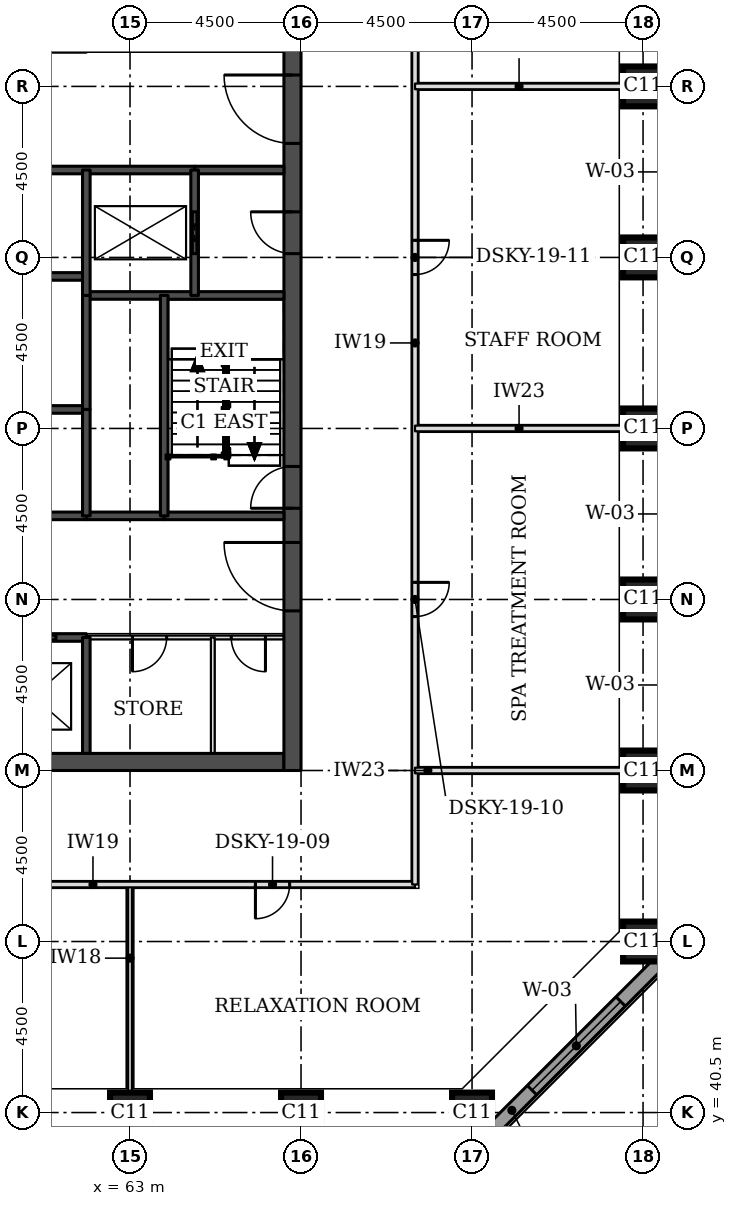
"""IFC4 building model, lengths in metres.
Left out: names, types, materials, properties, quantities, classifications, styles, units other than length and angle.
Written with IfcOpenShell. Run it as: python <this file> out.ifc"""

import sys

from ifc_helpers import new_model, si_unit, direction, frame, frame_2d, origin, origin_2d, place, context, subcontext, project, spatial, rectangle, extrude, element, fill, save


model = new_model("IFC4")
c1 = context("Model", 3, precision=1e-05, world=origin(), true_north=direction((0.0, 1.0)))
c2 = subcontext(c1, "Body", "Model", "MODEL_VIEW")
j1 = project(units=[si_unit("LENGTHUNIT", "METRE"), si_unit("PLANEANGLEUNIT", "RADIAN")], contexts=[c1])
p1 = place(None, origin())
s1 = spatial("IfcSite", under=j1, at=p1, CompositionType="ELEMENT")
p2 = place(p1, origin())
s2 = spatial("IfcBuilding", under=s1, at=p2, CompositionType="ELEMENT")
p3 = place(p2, frame((0.0, 0.0, 74.3)))
s3 = spatial("IfcBuildingStorey", under=s2, at=p3, CompositionType="ELEMENT", Elevation=74.3)
for number, where, z_axis, x_axis in (
    (1, (63.0, 40.5, 0.0), (0.0, 0.0, 1.0), (1.0, 0.0, 0.0)),
    (2, (67.5, 40.5, 0.0), (0.0, 0.0, 1.0), (1.0, 0.0, 0.0)),
    (3, (72.0, 40.5, 0.0), (0.0, 0.0, 1.0), (1.0, 0.0, 0.0)),
    (4, (76.5, 45.0, 0.0), (0.0, 0.0, 1.0), (1.0, 0.0, 0.0)),
    (5, (76.5, 49.5, 0.0), (0.0, 0.0, 1.0), (1.0, 0.0, 0.0)),
    (6, (76.5, 54.0, 0.0), (0.0, 0.0, 1.0), (1.0, 0.0, 0.0)),
    (7, (76.5, 58.5, 0.0), (0.0, 0.0, 1.0), (1.0, 0.0, 0.0)),
    (8, (76.5, 63.0, 0.0), (0.0, 0.0, 1.0), (1.0, 0.0, 0.0)),
    (9, (76.5, 67.5, 0.0), (0.0, 0.0, 1.0), (1.0, 0.0, 0.0)),
):
    element("IfcColumn", number, at=place(p3, frame(where, z_axis=z_axis, x_axis=x_axis)), inside=s3, PredefinedType="COLUMN", context=c2, shape_type="SweptSolid", body=[
        extrude(rectangle(XDim=1.05, YDim=1.05, at=origin_2d()), origin(), (0.0, 0.0, 1.0), 4.6),
    ])
p4 = place(p3, frame((45.45, 49.725, 0.0), z_axis=(0.0, 0.0, 1.0), x_axis=(1.0, 0.0, 0.0)))
e10 = element("IfcWall", 10, at=p4, inside=s3, PredefinedType="SHEAR", context=c2, shape_type="SweptSolid", body=[
    extrude(rectangle(XDim=21.6, YDim=0.45, at=frame_2d((10.8, 0.0))), origin(), (0.0, 0.0, 1.0), 4.6),
])
p5 = place(p3, frame((67.275, 49.5, 0.0), z_axis=(0.0, 0.0, 1.0), x_axis=(0.0, 1.0, 0.0)))
e11 = element("IfcWall", 11, at=p5, inside=s3, PredefinedType="SHEAR", context=c2, shape_type="SweptSolid", body=[
    extrude(rectangle(XDim=22.5, YDim=0.45, at=frame_2d((11.25, 0.0))), origin(), (0.0, 0.0, 1.0), 4.6),
])
p6 = place(p5, frame((4.2, 0.0, 0.0)))
e12 = element("IfcOpeningElement", 12, at=p6, cuts=e11, PredefinedType="OPENING", context=c2, shape_type="SweptSolid", body=[
    extrude(rectangle(XDim=1.8, YDim=2.1, at=frame_2d((0.9, 1.05))), frame((0.0, 0.235, 0.0), z_axis=(0.0, -1.0, 0.0), x_axis=(1.0, 0.0, 0.0)), (0.0, 0.0, 1.0), 0.47),
])
p7 = place(p5, frame((6.9, 0.0, 0.0)))
e13 = element("IfcOpeningElement", 13, at=p7, cuts=e11, PredefinedType="OPENING", context=c2, shape_type="SweptSolid", body=[
    extrude(rectangle(XDim=1.1, YDim=2.1, at=frame_2d((0.55, 1.05))), frame((0.0, 0.235, 0.0), z_axis=(0.0, -1.0, 0.0), x_axis=(1.0, 0.0, 0.0)), (0.0, 0.0, 1.0), 0.47),
])
p8 = place(p5, frame((13.6, 0.0, 0.0)))
e14 = element("IfcOpeningElement", 14, at=p8, cuts=e11, PredefinedType="OPENING", context=c2, shape_type="SweptSolid", body=[
    extrude(rectangle(XDim=1.1, YDim=2.1, at=frame_2d((0.55, 1.05))), frame((0.0, 0.235, 0.0), z_axis=(0.0, -1.0, 0.0), x_axis=(1.0, 0.0, 0.0)), (0.0, 0.0, 1.0), 0.47),
])
p9 = place(p5, frame((16.5, 0.0, 0.0)))
e15 = element("IfcOpeningElement", 15, at=p9, cuts=e11, PredefinedType="OPENING", context=c2, shape_type="SweptSolid", body=[
    extrude(rectangle(XDim=1.8, YDim=2.1, at=frame_2d((0.9, 1.05))), frame((0.0, 0.235, 0.0), z_axis=(0.0, -1.0, 0.0), x_axis=(1.0, 0.0, 0.0)), (0.0, 0.0, 1.0), 0.47),
])
p10 = place(p3, frame((72.239, 39.749, 0.0), z_axis=(0.0, 0.0, 1.0), x_axis=(0.707106781187, 0.707106781187, 0.0)))
e16 = element("IfcWall", 16, at=p10, inside=s3, PredefinedType="STANDARD", context=c2, shape_type="SweptSolid", body=[
    extrude(rectangle(XDim=7.089, YDim=0.35, at=frame_2d((3.544, 0.0))), origin(), (0.0, 0.0, 1.0), 4.425),
])
p11 = place(p10, frame((1.894, 0.0, 0.9)))
e17 = element("IfcOpeningElement", 17, at=p11, cuts=e16, PredefinedType="OPENING", context=c2, shape_type="SweptSolid", body=[
    extrude(rectangle(XDim=3.3, YDim=2.7, at=frame_2d((1.65, 1.35))), frame((0.0, 0.185, 0.0), z_axis=(0.0, -1.0, 0.0), x_axis=(1.0, 0.0, 0.0)), (0.0, 0.0, 1.0), 0.37),
])
p12 = place(p3, frame((63.0, 41.025, 0.0), z_axis=(0.0, 0.0, 1.0), x_axis=(0.0, 1.0, 0.0)))
e18 = element("IfcWall", 18, at=p12, inside=s3, PredefinedType="PARTITIONING", context=c2, shape_type="SweptSolid", body=[
    extrude(rectangle(XDim=5.475, YDim=0.1, at=frame_2d((2.738, 0.0))), origin(), (0.0, 0.0, 1.0), 4.45),
])
p13 = place(p3, frame((48.75, 46.5, 0.0), z_axis=(0.0, 0.0, 1.0), x_axis=(1.0, 0.0, 0.0)))
e19 = element("IfcWall", 19, at=p13, inside=s3, PredefinedType="PARTITIONING", context=c2, shape_type="SweptSolid", body=[
    extrude(rectangle(XDim=21.75, YDim=0.15, at=frame_2d((10.875, 0.0))), origin(), (0.0, 0.0, 1.0), 4.45),
])
p14 = place(p13, frame((9.3, 0.0, 0.0)))
e20 = element("IfcOpeningElement", 20, at=p14, cuts=e19, PredefinedType="OPENING", context=c2, shape_type="SweptSolid", body=[
    extrude(rectangle(XDim=0.9, YDim=2.1, at=frame_2d((0.45, 1.05))), frame((0.0, 0.085, 0.0), z_axis=(0.0, -1.0, 0.0), x_axis=(1.0, 0.0, 0.0)), (0.0, 0.0, 1.0), 0.17),
])
p15 = place(p13, frame((2.175, 0.0, 0.0)))
e21 = element("IfcOpeningElement", 21, at=p15, cuts=e19, PredefinedType="OPENING", context=c2, shape_type="SweptSolid", body=[
    extrude(rectangle(XDim=0.9, YDim=2.1, at=frame_2d((0.45, 1.05))), frame((0.0, 0.085, 0.0), z_axis=(0.0, -1.0, 0.0), x_axis=(1.0, 0.0, 0.0)), (0.0, 0.0, 1.0), 0.17),
])
p16 = place(p13, frame((17.55, 0.0, 0.0)))
e22 = element("IfcOpeningElement", 22, at=p16, cuts=e19, PredefinedType="OPENING", context=c2, shape_type="SweptSolid", body=[
    extrude(rectangle(XDim=0.9, YDim=2.1, at=frame_2d((0.45, 1.05))), frame((0.0, 0.085, 0.0), z_axis=(0.0, -1.0, 0.0), x_axis=(1.0, 0.0, 0.0)), (0.0, 0.0, 1.0), 0.17),
])
p17 = place(p3, frame((70.5, 46.5, 0.0), z_axis=(0.0, 0.0, 1.0), x_axis=(0.0, 1.0, 0.0)))
e23 = element("IfcWall", 23, at=p17, inside=s3, PredefinedType="PARTITIONING", context=c2, shape_type="SweptSolid", body=[
    extrude(rectangle(XDim=28.5, YDim=0.15, at=frame_2d((14.25, 0.0))), origin(), (0.0, 0.0, 1.0), 4.45),
])
p18 = place(p17, frame((7.05, 0.0, 0.0)))
e24 = element("IfcOpeningElement", 24, at=p18, cuts=e23, PredefinedType="OPENING", context=c2, shape_type="SweptSolid", body=[
    extrude(rectangle(XDim=0.9, YDim=2.1, at=frame_2d((0.45, 1.05))), frame((0.0, 0.085, 0.0), z_axis=(0.0, -1.0, 0.0), x_axis=(1.0, 0.0, 0.0)), (0.0, 0.0, 1.0), 0.17),
])
p19 = place(p17, frame((16.05, 0.0, 0.0)))
e25 = element("IfcOpeningElement", 25, at=p19, cuts=e23, PredefinedType="OPENING", context=c2, shape_type="SweptSolid", body=[
    extrude(rectangle(XDim=0.9, YDim=2.1, at=frame_2d((0.45, 1.05))), frame((0.0, 0.085, 0.0), z_axis=(0.0, -1.0, 0.0), x_axis=(1.0, 0.0, 0.0)), (0.0, 0.0, 1.0), 0.17),
])
p20 = place(p17, frame((23.85, 0.0, 0.0)))
e26 = element("IfcOpeningElement", 26, at=p20, cuts=e23, PredefinedType="OPENING", context=c2, shape_type="SweptSolid", body=[
    extrude(rectangle(XDim=1.8, YDim=2.4, at=frame_2d((0.9, 1.2))), frame((0.0, 0.085, 0.0), z_axis=(0.0, -1.0, 0.0), x_axis=(1.0, 0.0, 0.0)), (0.0, 0.0, 1.0), 0.17),
])
for number, where, z_axis, x_axis in (
    (27, (70.5, 49.5, 0.0), (0.0, 0.0, 1.0), (1.0, 0.0, 0.0)),
    (28, (70.5, 58.5, 0.0), (0.0, 0.0, 1.0), (1.0, 0.0, 0.0)),
    (29, (70.5, 67.5, 0.0), (0.0, 0.0, 1.0), (1.0, 0.0, 0.0)),
):
    element("IfcWall", number, at=place(p3, frame(where, z_axis=z_axis, x_axis=x_axis)), inside=s3, PredefinedType="PARTITIONING", context=c2, shape_type="SweptSolid", body=[
        extrude(rectangle(XDim=5.475, YDim=0.15, at=frame_2d((2.738, 0.0))), origin(), (0.0, 0.0, 1.0), 4.45),
    ])
p21 = place(p3, frame((61.85, 53.0, 0.0), z_axis=(0.0, 0.0, 1.0), x_axis=(1.0, 0.0, 0.0)))
e30 = element("IfcWall", 30, at=p21, inside=s3, PredefinedType="PARTITIONING", context=c2, shape_type="SweptSolid", body=[
    extrude(rectangle(XDim=5.2, YDim=0.1, at=frame_2d((2.6, 0.0))), origin(), (0.0, 0.0, 1.0), 4.45),
])
p22 = place(p21, frame((3.814, 0.0, 0.0)))
e31 = element("IfcOpeningElement", 31, at=p22, cuts=e30, PredefinedType="OPENING", context=c2, shape_type="SweptSolid", body=[
    extrude(rectangle(XDim=0.9, YDim=2.1, at=frame_2d((0.45, 1.05))), frame((0.0, 0.06, 0.0), z_axis=(0.0, -1.0, 0.0), x_axis=(1.0, 0.0, 0.0)), (0.0, 0.0, 1.0), 0.12),
])
p23 = place(p21, frame((1.214, 0.0, 0.0)))
e32 = element("IfcOpeningElement", 32, at=p23, cuts=e30, PredefinedType="OPENING", context=c2, shape_type="SweptSolid", body=[
    extrude(rectangle(XDim=0.9, YDim=2.1, at=frame_2d((0.45, 1.05))), frame((0.0, 0.06, 0.0), z_axis=(0.0, -1.0, 0.0), x_axis=(1.0, 0.0, 0.0)), (0.0, 0.0, 1.0), 0.12),
])
p24 = place(p3, frame((50.65, 53.0, 0.0), z_axis=(0.0, 0.0, 1.0), x_axis=(1.0, 0.0, 0.0)))
e33 = element("IfcWall", 33, at=p24, inside=s3, PredefinedType="SOLIDWALL", context=c2, shape_type="SweptSolid", body=[
    extrude(rectangle(XDim=11.2, YDim=0.2, at=frame_2d((5.6, 0.0))), origin(), (0.0, 0.0, 1.0), 4.45),
])
p25 = place(p24, frame((0.8, 0.0, 0.0)))
e34 = element("IfcOpeningElement", 34, at=p25, cuts=e33, PredefinedType="OPENING", context=c2, shape_type="SweptSolid", body=[
    extrude(rectangle(XDim=1.2, YDim=2.1, at=frame_2d((0.6, 1.05))), frame((0.0, 0.11, 0.0), z_axis=(0.0, -1.0, 0.0), x_axis=(1.0, 0.0, 0.0)), (0.0, 0.0, 1.0), 0.22),
])
p26 = place(p24, frame((3.6, 0.0, 0.0)))
e35 = element("IfcOpeningElement", 35, at=p26, cuts=e33, PredefinedType="OPENING", context=c2, shape_type="SweptSolid", body=[
    extrude(rectangle(XDim=1.2, YDim=2.1, at=frame_2d((0.6, 1.05))), frame((0.0, 0.11, 0.0), z_axis=(0.0, -1.0, 0.0), x_axis=(1.0, 0.0, 0.0)), (0.0, 0.0, 1.0), 0.22),
])
p27 = place(p24, frame((6.4, 0.0, 0.0)))
e36 = element("IfcOpeningElement", 36, at=p27, cuts=e33, PredefinedType="OPENING", context=c2, shape_type="SweptSolid", body=[
    extrude(rectangle(XDim=1.2, YDim=2.1, at=frame_2d((0.6, 1.05))), frame((0.0, 0.11, 0.0), z_axis=(0.0, -1.0, 0.0), x_axis=(1.0, 0.0, 0.0)), (0.0, 0.0, 1.0), 0.22),
])
p28 = place(p24, frame((9.2, 0.0, 0.0)))
e37 = element("IfcOpeningElement", 37, at=p28, cuts=e33, PredefinedType="OPENING", context=c2, shape_type="SweptSolid", body=[
    extrude(rectangle(XDim=1.2, YDim=2.1, at=frame_2d((0.6, 1.05))), frame((0.0, 0.11, 0.0), z_axis=(0.0, -1.0, 0.0), x_axis=(1.0, 0.0, 0.0)), (0.0, 0.0, 1.0), 0.22),
])
p29 = place(p3, frame((61.85, 56.2, 0.0), z_axis=(0.0, 0.0, 1.0), x_axis=(1.0, 0.0, 0.0)))
e38 = element("IfcWall", 38, at=p29, inside=s3, PredefinedType="SOLIDWALL", context=c2, shape_type="SweptSolid", body=[
    extrude(rectangle(XDim=2.05, YDim=0.2, at=frame_2d((1.025, 0.0))), origin(), (0.0, 0.0, 1.0), 4.45),
])
p30 = place(p3, frame((50.65, 56.2, 0.0), z_axis=(0.0, 0.0, 1.0), x_axis=(1.0, 0.0, 0.0)))
e39 = element("IfcWall", 39, at=p30, inside=s3, PredefinedType="SOLIDWALL", context=c2, shape_type="SweptSolid", body=[
    extrude(rectangle(XDim=11.2, YDim=0.2, at=frame_2d((5.6, 0.0))), origin(), (0.0, 0.0, 1.0), 4.45),
])
p31 = place(p3, frame((63.9, 56.2, 0.0), z_axis=(0.0, 0.0, 1.0), x_axis=(1.0, 0.0, 0.0)))
e40 = element("IfcWall", 40, at=p31, inside=s3, PredefinedType="SOLIDWALL", context=c2, shape_type="SweptSolid", body=[
    extrude(rectangle(XDim=3.15, YDim=0.2, at=frame_2d((1.575, 0.0))), origin(), (0.0, 0.0, 1.0), 4.45),
])
p32 = place(p3, frame((50.65, 59.0, 0.0), z_axis=(0.0, 0.0, 1.0), x_axis=(1.0, 0.0, 0.0)))
e41 = element("IfcWall", 41, at=p32, inside=s3, PredefinedType="SOLIDWALL", context=c2, shape_type="SweptSolid", body=[
    extrude(rectangle(XDim=11.2, YDim=0.2, at=frame_2d((5.6, 0.0))), origin(), (0.0, 0.0, 1.0), 4.6),
])
p33 = place(p3, frame((61.85, 62.0, 0.0), z_axis=(0.0, 0.0, 1.0), x_axis=(1.0, 0.0, 0.0)))
e42 = element("IfcWall", 42, at=p33, inside=s3, PredefinedType="SOLIDWALL", context=c2, shape_type="SweptSolid", body=[
    extrude(rectangle(XDim=5.2, YDim=0.2, at=frame_2d((2.6, 0.0))), origin(), (0.0, 0.0, 1.0), 4.45),
])
p34 = place(p3, frame((50.65, 62.5, 0.0), z_axis=(0.0, 0.0, 1.0), x_axis=(1.0, 0.0, 0.0)))
e43 = element("IfcWall", 43, at=p34, inside=s3, PredefinedType="SOLIDWALL", context=c2, shape_type="SweptSolid", body=[
    extrude(rectangle(XDim=11.2, YDim=0.2, at=frame_2d((5.6, 0.0))), origin(), (0.0, 0.0, 1.0), 4.6),
])
p35 = place(p3, frame((64.7, 65.3, 0.0), z_axis=(0.0, 0.0, 1.0), x_axis=(1.0, 0.0, 0.0)))
e44 = element("IfcWall", 44, at=p35, inside=s3, PredefinedType="SOLIDWALL", context=c2, shape_type="SweptSolid", body=[
    extrude(rectangle(XDim=2.35, YDim=0.2, at=frame_2d((1.175, 0.0))), origin(), (0.0, 0.0, 1.0), 4.45),
])
p36 = place(p3, frame((47.8, 65.3, 0.0), z_axis=(0.0, 0.0, 1.0), x_axis=(1.0, 0.0, 0.0)))
e45 = element("IfcWall", 45, at=p36, inside=s3, PredefinedType="SOLIDWALL", context=c2, shape_type="SweptSolid", body=[
    extrude(rectangle(XDim=16.9, YDim=0.2, at=frame_2d((8.45, 0.0))), origin(), (0.0, 0.0, 1.0), 4.45),
])
p37 = place(p3, frame((61.85, 59.0, 0.0), z_axis=(0.0, 0.0, 1.0), x_axis=(0.0, 1.0, 0.0)))
e46 = element("IfcWall", 46, at=p37, inside=s3, PredefinedType="SOLIDWALL", context=c2, shape_type="SweptSolid", body=[
    extrude(rectangle(XDim=3.0, YDim=0.2, at=frame_2d((1.5, 0.0))), origin(), (0.0, 0.0, 1.0), 4.6),
])
p38 = place(p3, frame((61.85, 49.95, 0.0), z_axis=(0.0, 0.0, 1.0), x_axis=(0.0, 1.0, 0.0)))
e47 = element("IfcWall", 47, at=p38, inside=s3, PredefinedType="SOLIDWALL", context=c2, shape_type="SweptSolid", body=[
    extrude(rectangle(XDim=3.05, YDim=0.2, at=frame_2d((1.525, 0.0))), origin(), (0.0, 0.0, 1.0), 4.45),
])
p39 = place(p3, frame((61.85, 56.2, 0.0), z_axis=(0.0, 0.0, 1.0), x_axis=(0.0, 1.0, 0.0)))
e48 = element("IfcWall", 48, at=p39, inside=s3, PredefinedType="SOLIDWALL", context=c2, shape_type="SweptSolid", body=[
    extrude(rectangle(XDim=2.8, YDim=0.2, at=frame_2d((1.4, 0.0))), origin(), (0.0, 0.0, 1.0), 4.45),
])
p40 = place(p3, frame((61.85, 62.0, 0.0), z_axis=(0.0, 0.0, 1.0), x_axis=(0.0, 1.0, 0.0)))
e49 = element("IfcWall", 49, at=p40, inside=s3, PredefinedType="SOLIDWALL", context=c2, shape_type="SweptSolid", body=[
    extrude(rectangle(XDim=3.3, YDim=0.2, at=frame_2d((1.65, 0.0))), origin(), (0.0, 0.0, 1.0), 4.45),
])
p41 = place(p3, frame((63.9, 56.2, 0.0), z_axis=(0.0, 0.0, 1.0), x_axis=(0.0, 1.0, 0.0)))
e50 = element("IfcWall", 50, at=p41, inside=s3, PredefinedType="SOLIDWALL", context=c2, shape_type="SweptSolid", body=[
    extrude(rectangle(XDim=5.8, YDim=0.2, at=frame_2d((2.9, 0.0))), origin(), (0.0, 0.0, 1.0), 4.45),
])
p42 = place(p3, frame((64.7, 62.0, 0.0), z_axis=(0.0, 0.0, 1.0), x_axis=(0.0, 1.0, 0.0)))
e51 = element("IfcWall", 51, at=p42, inside=s3, PredefinedType="SOLIDWALL", context=c2, shape_type="SweptSolid", body=[
    extrude(rectangle(XDim=3.3, YDim=0.2, at=frame_2d((1.65, 0.0))), origin(), (0.0, 0.0, 1.0), 4.45),
])
p43 = place(p42, frame((1.1, 0.0, 0.0)))
e52 = element("IfcOpeningElement", 52, at=p43, cuts=e51, PredefinedType="OPENING", context=c2, shape_type="SweptSolid", body=[
    extrude(rectangle(XDim=1.1, YDim=2.1, at=frame_2d((0.55, 1.05))), frame((0.0, 0.11, 0.0), z_axis=(0.0, -1.0, 0.0), x_axis=(1.0, 0.0, 0.0)), (0.0, 0.0, 1.0), 0.22),
])
p44 = place(p3, frame((65.178, 49.95, 0.0), z_axis=(0.0, 0.0, 1.0), x_axis=(0.0, 1.0, 0.0)))
e53 = element("IfcWall", 53, at=p44, inside=s3, PredefinedType="PARTITIONING", context=c2, shape_type="SweptSolid", body=[
    extrude(rectangle(XDim=3.05, YDim=0.1, at=frame_2d((1.525, 0.0))), origin(), (0.0, 0.0, 1.0), 4.45),
])
p45 = place(p11, origin())
e54 = element("IfcWindow", 54, at=p45, inside=s3, PartitioningType="SINGLE_PANEL", PredefinedType="WINDOW", context=c2, shape_type="SweptSolid", body=[
    extrude(rectangle(XDim=3.3, YDim=2.7, at=frame_2d((1.65, 1.35))), frame((0.0, 0.085, 0.0), z_axis=(0.0, -1.0, 0.0), x_axis=(1.0, 0.0, 0.0)), (0.0, 0.0, 1.0), 0.06),
])
fill(e17, e54)
p46 = place(p16, frame((0.9, 0.0, 0.0), z_axis=(0.0, 0.0, 1.0), x_axis=(-1.0, 0.0, 0.0)))
e55 = element("IfcDoor", 55, at=p46, inside=s3, OperationType="SINGLE_SWING_RIGHT", PredefinedType="DOOR", context=c2, shape_type="SweptSolid", body=[
    extrude(rectangle(XDim=0.9, YDim=2.1, at=frame_2d((0.45, 1.05))), frame((0.0, 0.025, 0.0), z_axis=(0.0, -1.0, 0.0), x_axis=(1.0, 0.0, 0.0)), (0.0, 0.0, 1.0), 0.05),
])
fill(e22, e55)
p47 = place(p18, frame((0.9, 0.0, 0.0), z_axis=(0.0, 0.0, 1.0), x_axis=(-1.0, 0.0, 0.0)))
e56 = element("IfcDoor", 56, at=p47, inside=s3, OperationType="SINGLE_SWING_LEFT", PredefinedType="DOOR", context=c2, shape_type="SweptSolid", body=[
    extrude(rectangle(XDim=0.9, YDim=2.1, at=frame_2d((0.45, 1.05))), frame((0.0, 0.025, 0.0), z_axis=(0.0, -1.0, 0.0), x_axis=(1.0, 0.0, 0.0)), (0.0, 0.0, 1.0), 0.05),
])
fill(e24, e56)
p48 = place(p19, frame((0.9, 0.0, 0.0), z_axis=(0.0, 0.0, 1.0), x_axis=(-1.0, 0.0, 0.0)))
e57 = element("IfcDoor", 57, at=p48, inside=s3, OperationType="SINGLE_SWING_LEFT", PredefinedType="DOOR", context=c2, shape_type="SweptSolid", body=[
    extrude(rectangle(XDim=0.9, YDim=2.1, at=frame_2d((0.45, 1.05))), frame((0.0, 0.025, 0.0), z_axis=(0.0, -1.0, 0.0), x_axis=(1.0, 0.0, 0.0)), (0.0, 0.0, 1.0), 0.05),
])
fill(e25, e57)
p49 = place(p28, origin())
e58 = element("IfcDoor", 58, at=p49, inside=s3, OperationType="DOUBLE_DOOR_SLIDING", PredefinedType="DOOR", context=c2, shape_type="SweptSolid", body=[
    extrude(rectangle(XDim=1.2, YDim=2.1, at=frame_2d((0.6, 1.05))), frame((0.0, 0.025, 0.0), z_axis=(0.0, -1.0, 0.0), x_axis=(1.0, 0.0, 0.0)), (0.0, 0.0, 1.0), 0.05),
])
fill(e37, e58)
p50 = place(p43, origin())
e59 = element("IfcDoor", 59, at=p50, inside=s3, OperationType="DOUBLE_DOOR_SLIDING", PredefinedType="DOOR", context=c2, shape_type="SweptSolid", body=[
    extrude(rectangle(XDim=1.1, YDim=2.1, at=frame_2d((0.55, 1.05))), frame((0.0, 0.025, 0.0), z_axis=(0.0, -1.0, 0.0), x_axis=(1.0, 0.0, 0.0)), (0.0, 0.0, 1.0), 0.05),
])
fill(e52, e59)
p51 = place(p6, origin())
e60 = element("IfcDoor", 60, at=p51, inside=s3, OperationType="SINGLE_SWING_RIGHT", PredefinedType="DOOR", context=c2, shape_type="SweptSolid", body=[
    extrude(rectangle(XDim=1.8, YDim=2.1, at=frame_2d((0.9, 1.05))), frame((0.0, 0.025, 0.0), z_axis=(0.0, -1.0, 0.0), x_axis=(1.0, 0.0, 0.0)), (0.0, 0.0, 1.0), 0.05),
])
fill(e12, e60)
p52 = place(p7, origin())
e61 = element("IfcDoor", 61, at=p52, inside=s3, OperationType="SINGLE_SWING_LEFT", PredefinedType="DOOR", context=c2, shape_type="SweptSolid", body=[
    extrude(rectangle(XDim=1.1, YDim=2.1, at=frame_2d((0.55, 1.05))), frame((0.0, 0.025, 0.0), z_axis=(0.0, -1.0, 0.0), x_axis=(1.0, 0.0, 0.0)), (0.0, 0.0, 1.0), 0.05),
])
fill(e13, e61)
p53 = place(p8, origin())
e62 = element("IfcDoor", 62, at=p53, inside=s3, OperationType="SINGLE_SWING_RIGHT", PredefinedType="DOOR", context=c2, shape_type="SweptSolid", body=[
    extrude(rectangle(XDim=1.1, YDim=2.1, at=frame_2d((0.55, 1.05))), frame((0.0, 0.025, 0.0), z_axis=(0.0, -1.0, 0.0), x_axis=(1.0, 0.0, 0.0)), (0.0, 0.0, 1.0), 0.05),
])
fill(e14, e62)
p54 = place(p9, origin())
e63 = element("IfcDoor", 63, at=p54, inside=s3, OperationType="SINGLE_SWING_RIGHT", PredefinedType="DOOR", context=c2, shape_type="SweptSolid", body=[
    extrude(rectangle(XDim=1.8, YDim=2.1, at=frame_2d((0.9, 1.05))), frame((0.0, 0.025, 0.0), z_axis=(0.0, -1.0, 0.0), x_axis=(1.0, 0.0, 0.0)), (0.0, 0.0, 1.0), 0.05),
])
fill(e15, e63)
p55 = place(p22, frame((0.9, 0.0, 0.0), z_axis=(0.0, 0.0, 1.0), x_axis=(-1.0, 0.0, 0.0)))
e64 = element("IfcDoor", 64, at=p55, inside=s3, OperationType="SINGLE_SWING_LEFT", PredefinedType="DOOR", context=c2, shape_type="SweptSolid", body=[
    extrude(rectangle(XDim=0.9, YDim=2.1, at=frame_2d((0.45, 1.05))), frame((0.0, 0.025, 0.0), z_axis=(0.0, -1.0, 0.0), x_axis=(1.0, 0.0, 0.0)), (0.0, 0.0, 1.0), 0.05),
])
fill(e31, e64)
p56 = place(p23, frame((0.9, 0.0, 0.0), z_axis=(0.0, 0.0, 1.0), x_axis=(-1.0, 0.0, 0.0)))
e65 = element("IfcDoor", 65, at=p56, inside=s3, OperationType="SINGLE_SWING_RIGHT", PredefinedType="DOOR", context=c2, shape_type="SweptSolid", body=[
    extrude(rectangle(XDim=0.9, YDim=2.1, at=frame_2d((0.45, 1.05))), frame((0.0, 0.025, 0.0), z_axis=(0.0, -1.0, 0.0), x_axis=(1.0, 0.0, 0.0)), (0.0, 0.0, 1.0), 0.05),
])
fill(e32, e65)
save(model, sys.argv[1])
